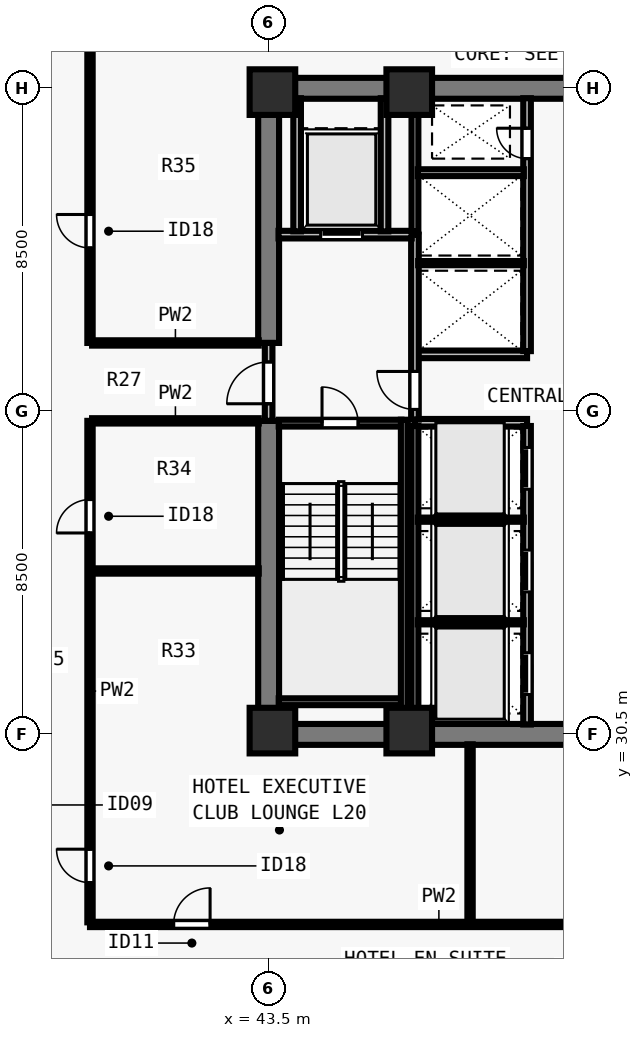
"""IFC4 building model, lengths in metres.
Left out: names, types, materials, properties, quantities, classifications, styles, units other than length and angle.
Written with IfcOpenShell. Run it as: python <this file> out.ifc"""

import sys

from ifc_helpers import new_model, si_unit, direction, frame, frame_2d, origin, origin_2d, place, context, subcontext, project, spatial, rectangle, extrude, element, fill, save


model = new_model("IFC4")
c1 = context("Model", 3, precision=1e-05, world=origin(), true_north=direction((0.0, 1.0)))
c2 = subcontext(c1, "Body", "Model", "MODEL_VIEW")
j1 = project(units=[si_unit("LENGTHUNIT", "METRE"), si_unit("PLANEANGLEUNIT", "RADIAN")], contexts=[c1])
p1 = place(None, origin())
s1 = spatial("IfcSite", under=j1, at=p1, CompositionType="ELEMENT")
p2 = place(p1, origin())
s2 = spatial("IfcBuilding", under=s1, at=p2, CompositionType="ELEMENT")
p3 = place(p2, frame((0.0, 0.0, 76.0)))
s3 = spatial("IfcBuildingStorey", under=s2, at=p3, CompositionType="ELEMENT", Elevation=76.0)
for number, where, z_axis, x_axis in (
    (1, (43.6, 30.6, 0.0), (0.0, 0.0, 1.0), (1.0, 0.0, 0.0)),
    (2, (47.2, 30.6, 0.0), (0.0, 0.0, 1.0), (1.0, 0.0, 0.0)),
    (3, (43.6, 47.4, 0.0), (0.0, 0.0, 1.0), (1.0, 0.0, 0.0)),
    (4, (47.2, 47.4, 0.0), (0.0, 0.0, 1.0), (1.0, 0.0, 0.0)),
):
    element("IfcColumn", number, at=place(p3, frame(where, z_axis=z_axis, x_axis=x_axis)), inside=s3, PredefinedType="COLUMN", context=c2, shape_type="SweptSolid", body=[
        extrude(rectangle(XDim=1.2, YDim=1.2, at=origin_2d()), origin(), (0.0, 0.0, 1.0), 3.5),
    ])
for number, where, z_axis, x_axis in (
    (5, (43.225, 30.5, 0.0), (0.0, 0.0, 1.0), (1.0, 0.0, 0.0)),
    (6, (43.225, 47.5, 0.0), (0.0, 0.0, 1.0), (1.0, 0.0, 0.0)),
):
    element("IfcWall", number, at=place(p3, frame(where, z_axis=z_axis, x_axis=x_axis)), inside=s3, PredefinedType="SHEAR", context=c2, shape_type="SweptSolid", body=[
        extrude(rectangle(XDim=17.55, YDim=0.55, at=frame_2d((8.775, 0.0))), origin(), (0.0, 0.0, 1.0), 3.28),
    ])
p4 = place(p3, frame((43.5, 30.765, 0.0), z_axis=(0.0, 0.0, 1.0), x_axis=(0.0, 1.0, 0.0)))
e7 = element("IfcWall", 7, at=p4, inside=s3, PredefinedType="SHEAR", context=c2, shape_type="SweptSolid", body=[
    extrude(rectangle(XDim=7.985, YDim=0.55, at=frame_2d((3.993, 0.0))), origin(), (0.0, 0.0, 1.0), 3.28),
])
p5 = place(p3, frame((43.5, 40.8, 0.0), z_axis=(0.0, 0.0, 1.0), x_axis=(0.0, 1.0, 0.0)))
e8 = element("IfcWall", 8, at=p5, inside=s3, PredefinedType="SHEAR", context=c2, shape_type="SweptSolid", body=[
    extrude(rectangle(XDim=6.435, YDim=0.55, at=frame_2d((3.218, 0.0))), origin(), (0.0, 0.0, 1.0), 3.28),
])
for number, where, z_axis, x_axis in (
    (9, (47.35, 38.7, 0.0), (0.0, 0.0, 1.0), (1.0, 0.0, 0.0)),
    (10, (47.35, 40.5, 0.0), (0.0, 0.0, 1.0), (1.0, 0.0, 0.0)),
):
    element("IfcWall", number, at=place(p3, frame(where, z_axis=z_axis, x_axis=x_axis)), inside=s3, PredefinedType="SOLIDWALL", context=c2, shape_type="SweptSolid", body=[
        extrude(rectangle(XDim=2.95, YDim=0.2, at=frame_2d((1.475, 0.0))), origin(), (0.0, 0.0, 1.0), 3.28),
    ])
p6 = place(p3, frame((50.3, 30.76, 0.0), z_axis=(0.0, 0.0, 1.0), x_axis=(0.0, 1.0, 0.0)))
e11 = element("IfcWall", 11, at=p6, inside=s3, PredefinedType="SOLIDWALL", context=c2, shape_type="SweptSolid", body=[
    extrude(rectangle(XDim=7.855, YDim=0.2, at=frame_2d((3.927, 0.0))), origin(), (0.0, 0.0, 1.0), 3.28),
])
p7 = place(p6, frame((0.79, 0.0, 0.0)))
e12 = element("IfcOpeningElement", 12, at=p7, cuts=e11, PredefinedType="OPENING", context=c2, shape_type="SweptSolid", body=[
    extrude(rectangle(XDim=1.1, YDim=2.2, at=frame_2d((0.55, 1.1))), frame((0.0, 0.11, 0.0), z_axis=(0.0, -1.0, 0.0), x_axis=(1.0, 0.0, 0.0)), (0.0, 0.0, 1.0), 0.22),
])
p8 = place(p6, frame((3.49, 0.0, 0.0)))
e13 = element("IfcOpeningElement", 13, at=p8, cuts=e11, PredefinedType="OPENING", context=c2, shape_type="SweptSolid", body=[
    extrude(rectangle(XDim=1.1, YDim=2.2, at=frame_2d((0.55, 1.1))), frame((0.0, 0.11, 0.0), z_axis=(0.0, -1.0, 0.0), x_axis=(1.0, 0.0, 0.0)), (0.0, 0.0, 1.0), 0.22),
])
p9 = place(p6, frame((6.19, 0.0, 0.0)))
e14 = element("IfcOpeningElement", 14, at=p9, cuts=e11, PredefinedType="OPENING", context=c2, shape_type="SweptSolid", body=[
    extrude(rectangle(XDim=1.1, YDim=2.2, at=frame_2d((0.55, 1.1))), frame((0.0, 0.11, 0.0), z_axis=(0.0, -1.0, 0.0), x_axis=(1.0, 0.0, 0.0)), (0.0, 0.0, 1.0), 0.22),
])
p10 = place(p3, frame((50.3, 40.585, 0.0), z_axis=(0.0, 0.0, 1.0), x_axis=(0.0, 1.0, 0.0)))
e15 = element("IfcWall", 15, at=p10, inside=s3, PredefinedType="SOLIDWALL", context=c2, shape_type="SweptSolid", body=[
    extrude(rectangle(XDim=6.655, YDim=0.2, at=frame_2d((3.328, 0.0))), origin(), (0.0, 0.0, 1.0), 3.28),
])
p11 = place(p10, frame((5.065, 0.0, 0.0)))
e16 = element("IfcOpeningElement", 16, at=p11, cuts=e15, PredefinedType="OPENING", context=c2, shape_type="SweptSolid", body=[
    extrude(rectangle(XDim=0.8, YDim=2.08, at=frame_2d((0.4, 1.04))), frame((0.0, 0.11, 0.0), z_axis=(0.0, -1.0, 0.0), x_axis=(1.0, 0.0, 0.0)), (0.0, 0.0, 1.0), 0.22),
])
p12 = place(p3, frame((43.5, 38.75, 0.0), z_axis=(0.0, 0.0, 1.0), x_axis=(0.0, 1.0, 0.0)))
e17 = element("IfcWall", 17, at=p12, inside=s3, PredefinedType="SOLIDWALL", context=c2, shape_type="SweptSolid", body=[
    extrude(rectangle(XDim=2.05, YDim=0.2, at=frame_2d((1.025, 0.0))), origin(), (0.0, 0.0, 1.0), 3.28),
])
p13 = place(p12, frame((0.45, 0.0, 0.0)))
e18 = element("IfcOpeningElement", 18, at=p13, cuts=e17, PredefinedType="OPENING", context=c2, shape_type="SweptSolid", body=[
    extrude(rectangle(XDim=1.1, YDim=2.15, at=frame_2d((0.55, 1.075))), frame((0.0, 0.11, 0.0), z_axis=(0.0, -1.0, 0.0), x_axis=(1.0, 0.0, 0.0)), (0.0, 0.0, 1.0), 0.22),
])
p14 = place(p3, frame((47.35, 38.785, 0.0), z_axis=(0.0, 0.0, 1.0), x_axis=(0.0, 1.0, 0.0)))
e19 = element("IfcWall", 19, at=p14, inside=s3, PredefinedType="SOLIDWALL", context=c2, shape_type="SweptSolid", body=[
    extrude(rectangle(XDim=4.865, YDim=0.2, at=frame_2d((2.433, 0.0))), origin(), (0.0, 0.0, 1.0), 3.28),
])
p15 = place(p14, frame((0.265, 0.0, 0.0)))
e20 = element("IfcOpeningElement", 20, at=p15, cuts=e19, PredefinedType="OPENING", context=c2, shape_type="SweptSolid", body=[
    extrude(rectangle(XDim=1.0, YDim=2.15, at=frame_2d((0.5, 1.075))), frame((0.0, 0.11, 0.0), z_axis=(0.0, -1.0, 0.0), x_axis=(1.0, 0.0, 0.0)), (0.0, 0.0, 1.0), 0.22),
])
p16 = place(p3, frame((43.76, 43.65, 0.0), z_axis=(0.0, 0.0, 1.0), x_axis=(1.0, 0.0, 0.0)))
e21 = element("IfcWall", 21, at=p16, inside=s3, PredefinedType="SOLIDWALL", context=c2, shape_type="SweptSolid", body=[
    extrude(rectangle(XDim=3.505, YDim=0.2, at=frame_2d((1.752, 0.0))), origin(), (0.0, 0.0, 1.0), 3.28),
])
p17 = place(p16, frame((1.11, 0.0, 0.0)))
e22 = element("IfcOpeningElement", 22, at=p17, cuts=e21, PredefinedType="OPENING", context=c2, shape_type="SweptSolid", body=[
    extrude(rectangle(XDim=1.1, YDim=2.2, at=frame_2d((0.55, 1.1))), frame((0.0, 0.11, 0.0), z_axis=(0.0, -1.0, 0.0), x_axis=(1.0, 0.0, 0.0)), (0.0, 0.0, 1.0), 0.22),
])
for number, where, z_axis, x_axis in (
    (23, (46.55, 43.735, 0.0), (0.0, 0.0, 1.0), (0.0, 1.0, 0.0)),
    (24, (44.25, 43.735, 0.0), (0.0, 0.0, 1.0), (0.0, 1.0, 0.0)),
):
    element("IfcWall", number, at=place(p3, frame(where, z_axis=z_axis, x_axis=x_axis)), inside=s3, PredefinedType="SOLIDWALL", context=c2, shape_type="SweptSolid", body=[
        extrude(rectangle(XDim=3.505, YDim=0.2, at=frame_2d((1.752, 0.0))), origin(), (0.0, 0.0, 1.0), 3.28),
    ])
p18 = place(p3, frame((47.35, 30.76, 0.0), z_axis=(0.0, 0.0, 1.0), x_axis=(0.0, 1.0, 0.0)))
e25 = element("IfcWall", 25, at=p18, inside=s3, PredefinedType="SOLIDWALL", context=c2, shape_type="SweptSolid", body=[
    extrude(rectangle(XDim=7.855, YDim=0.18, at=frame_2d((3.927, 0.0))), origin(), (0.0, 0.0, 1.0), 3.28),
])
for number, where, z_axis, x_axis in (
    (26, (47.425, 33.45, 0.0), (0.0, 0.0, 1.0), (1.0, 0.0, 0.0)),
    (27, (47.425, 36.15, 0.0), (0.0, 0.0, 1.0), (1.0, 0.0, 0.0)),
):
    element("IfcWall", number, at=place(p3, frame(where, z_axis=z_axis, x_axis=x_axis)), inside=s3, PredefinedType="PARTITIONING", context=c2, shape_type="SweptSolid", body=[
        extrude(rectangle(XDim=2.79, YDim=0.11, at=frame_2d((1.395, 0.0))), origin(), (0.0, 0.0, 1.0), 3.28),
    ])
p19 = place(p3, frame((47.35, 43.735, 0.0), z_axis=(0.0, 0.0, 1.0), x_axis=(0.0, 1.0, 0.0)))
e28 = element("IfcWall", 28, at=p19, inside=s3, PredefinedType="SOLIDWALL", context=c2, shape_type="SweptSolid", body=[
    extrude(rectangle(XDim=3.505, YDim=0.18, at=frame_2d((1.752, 0.0))), origin(), (0.0, 0.0, 1.0), 3.28),
])
p20 = place(p3, frame((47.435, 42.9, 0.0), z_axis=(0.0, 0.0, 1.0), x_axis=(1.0, 0.0, 0.0)))
e29 = element("IfcWall", 29, at=p20, inside=s3, PredefinedType="PARTITIONING", context=c2, shape_type="SweptSolid", body=[
    extrude(rectangle(XDim=2.78, YDim=0.11, at=frame_2d((1.39, 0.0))), origin(), (0.0, 0.0, 1.0), 3.28),
])
p21 = place(p3, frame((47.425, 45.28, 0.0), z_axis=(0.0, 0.0, 1.0), x_axis=(1.0, 0.0, 0.0)))
e30 = element("IfcWall", 30, at=p21, inside=s3, PredefinedType="SOLIDWALL", context=c2, shape_type="SweptSolid", body=[
    extrude(rectangle(XDim=2.79, YDim=0.18, at=frame_2d((1.395, 0.0))), origin(), (0.0, 0.0, 1.0), 3.28),
])
p22 = place(p3, frame((38.8, 25.5, 0.0), z_axis=(0.0, 0.0, 1.0), x_axis=(1.0, 0.0, 0.0)))
e31 = element("IfcWall", 31, at=p22, inside=s3, PredefinedType="PARTITIONING", context=c2, shape_type="SweptSolid", body=[
    extrude(rectangle(XDim=26.4, YDim=0.14, at=frame_2d((13.2, 0.0))), origin(), (0.0, 0.0, 1.0), 3.28),
])
p23 = place(p22, frame((2.2, 0.0, 0.0)))
e32 = element("IfcOpeningElement", 32, at=p23, cuts=e31, PredefinedType="OPENING", context=c2, shape_type="SweptSolid", body=[
    extrude(rectangle(XDim=0.96, YDim=2.12, at=frame_2d((0.48, 1.06))), frame((0.0, 0.08, 0.0), z_axis=(0.0, -1.0, 0.0), x_axis=(1.0, 0.0, 0.0)), (0.0, 0.0, 1.0), 0.16),
])
p24 = place(p22, frame((15.2, 0.0, 0.0)))
e33 = element("IfcOpeningElement", 33, at=p24, cuts=e31, PredefinedType="OPENING", context=c2, shape_type="SweptSolid", body=[
    extrude(rectangle(XDim=0.96, YDim=2.12, at=frame_2d((0.48, 1.06))), frame((0.0, 0.08, 0.0), z_axis=(0.0, -1.0, 0.0), x_axis=(1.0, 0.0, 0.0)), (0.0, 0.0, 1.0), 0.16),
])
p25 = place(p3, frame((38.8, 25.555, 0.0), z_axis=(0.0, 0.0, 1.0), x_axis=(0.0, 1.0, 0.0)))
e34 = element("IfcWall", 34, at=p25, inside=s3, PredefinedType="PARTITIONING", context=c2, shape_type="SweptSolid", body=[
    extrude(rectangle(XDim=13.195, YDim=0.14, at=frame_2d((6.598, 0.0))), origin(), (0.0, 0.0, 1.0), 3.28),
])
p26 = place(p25, frame((1.045, 0.0, 0.0)))
e35 = element("IfcOpeningElement", 35, at=p26, cuts=e34, PredefinedType="OPENING", context=c2, shape_type="SweptSolid", body=[
    extrude(rectangle(XDim=0.88, YDim=2.1, at=frame_2d((0.44, 1.05))), frame((0.0, 0.08, 0.0), z_axis=(0.0, -1.0, 0.0), x_axis=(1.0, 0.0, 0.0)), (0.0, 0.0, 1.0), 0.16),
])
p27 = place(p25, frame((10.245, 0.0, 0.0)))
e36 = element("IfcOpeningElement", 36, at=p27, cuts=e34, PredefinedType="OPENING", context=c2, shape_type="SweptSolid", body=[
    extrude(rectangle(XDim=0.88, YDim=2.1, at=frame_2d((0.44, 1.05))), frame((0.0, 0.08, 0.0), z_axis=(0.0, -1.0, 0.0), x_axis=(1.0, 0.0, 0.0)), (0.0, 0.0, 1.0), 0.16),
])
p28 = place(p3, frame((38.8, 40.8, 0.0), z_axis=(0.0, 0.0, 1.0), x_axis=(0.0, 1.0, 0.0)))
e37 = element("IfcWall", 37, at=p28, inside=s3, PredefinedType="PARTITIONING", context=c2, shape_type="SweptSolid", body=[
    extrude(rectangle(XDim=11.645, YDim=0.14, at=frame_2d((5.823, 0.0))), origin(), (0.0, 0.0, 1.0), 3.28),
])
p29 = place(p28, frame((2.5, 0.0, 0.0)))
e38 = element("IfcOpeningElement", 38, at=p29, cuts=e37, PredefinedType="OPENING", context=c2, shape_type="SweptSolid", body=[
    extrude(rectangle(XDim=0.88, YDim=2.1, at=frame_2d((0.44, 1.05))), frame((0.0, 0.08, 0.0), z_axis=(0.0, -1.0, 0.0), x_axis=(1.0, 0.0, 0.0)), (0.0, 0.0, 1.0), 0.16),
])
for number, where, z_axis, x_axis in (
    (39, (38.855, 38.75, 0.0), (0.0, 0.0, 1.0), (1.0, 0.0, 0.0)),
    (40, (38.855, 40.8, 0.0), (0.0, 0.0, 1.0), (1.0, 0.0, 0.0)),
):
    element("IfcWall", number, at=place(p3, frame(where, z_axis=z_axis, x_axis=x_axis)), inside=s3, PredefinedType="PARTITIONING", context=c2, shape_type="SweptSolid", body=[
        extrude(rectangle(XDim=4.385, YDim=0.14, at=frame_2d((2.192, 0.0))), origin(), (0.0, 0.0, 1.0), 3.28),
    ])
p30 = place(p3, frame((48.8, 25.555, 0.0), z_axis=(0.0, 0.0, 1.0), x_axis=(0.0, 1.0, 0.0)))
e41 = element("IfcWall", 41, at=p30, inside=s3, PredefinedType="PARTITIONING", context=c2, shape_type="SweptSolid", body=[
    extrude(rectangle(XDim=4.685, YDim=0.14, at=frame_2d((2.343, 0.0))), origin(), (0.0, 0.0, 1.0), 3.28),
])
p31 = place(p3, frame((38.855, 34.8, 0.0), z_axis=(0.0, 0.0, 1.0), x_axis=(1.0, 0.0, 0.0)))
e42 = element("IfcWall", 42, at=p31, inside=s3, PredefinedType="PARTITIONING", context=c2, shape_type="SweptSolid", body=[
    extrude(rectangle(XDim=4.385, YDim=0.14, at=frame_2d((2.192, 0.0))), origin(), (0.0, 0.0, 1.0), 3.28),
])
p32 = place(p3, frame((43.765, 38.69, 0.0), z_axis=(0.0, 0.0, 1.0), x_axis=(1.0, 0.0, 0.0)))
e43 = element("IfcWall", 43, at=p32, inside=s3, PredefinedType="SOLIDWALL", context=c2, shape_type="SweptSolid", body=[
    extrude(rectangle(XDim=3.23, YDim=0.18, at=frame_2d((1.615, 0.0))), origin(), (0.0, 0.0, 1.0), 3.28),
])
p33 = place(p32, frame((1.14, 0.0, 0.0)))
e44 = element("IfcOpeningElement", 44, at=p33, cuts=e43, PredefinedType="OPENING", context=c2, shape_type="SweptSolid", body=[
    extrude(rectangle(XDim=0.95, YDim=2.15, at=frame_2d((0.475, 1.075))), frame((0.0, 0.1, 0.0), z_axis=(0.0, -1.0, 0.0), x_axis=(1.0, 0.0, 0.0)), (0.0, 0.0, 1.0), 0.2),
])
p34 = place(p3, frame((43.765, 31.36, 0.0), z_axis=(0.0, 0.0, 1.0), x_axis=(1.0, 0.0, 0.0)))
e45 = element("IfcWall", 45, at=p34, inside=s3, PredefinedType="SOLIDWALL", context=c2, shape_type="SweptSolid", body=[
    extrude(rectangle(XDim=3.23, YDim=0.18, at=frame_2d((1.615, 0.0))), origin(), (0.0, 0.0, 1.0), 3.28),
])
p35 = place(p3, frame((47.07, 38.78, 0.0), z_axis=(0.0, 0.0, 1.0), x_axis=(0.0, -1.0, 0.0)))
e46 = element("IfcWall", 46, at=p35, inside=s3, PredefinedType="SOLIDWALL", context=c2, shape_type="SweptSolid", body=[
    extrude(rectangle(XDim=8.017, YDim=0.18, at=frame_2d((4.009, 0.0))), origin(), (0.0, 0.0, 1.0), 3.28),
])
p36 = place(p13, origin())
e47 = element("IfcDoor", 47, at=p36, inside=s3, OperationType="SINGLE_SWING_LEFT", PredefinedType="DOOR", context=c2, shape_type="SweptSolid", body=[
    extrude(rectangle(XDim=1.1, YDim=2.15, at=frame_2d((0.55, 1.075))), frame((0.0, 0.025, 0.0), z_axis=(0.0, -1.0, 0.0), x_axis=(1.0, 0.0, 0.0)), (0.0, 0.0, 1.0), 0.05),
])
fill(e18, e47)
p37 = place(p15, origin())
e48 = element("IfcDoor", 48, at=p37, inside=s3, OperationType="SINGLE_SWING_RIGHT", PredefinedType="DOOR", context=c2, shape_type="SweptSolid", body=[
    extrude(rectangle(XDim=1.0, YDim=2.15, at=frame_2d((0.5, 1.075))), frame((0.0, 0.025, 0.0), z_axis=(0.0, -1.0, 0.0), x_axis=(1.0, 0.0, 0.0)), (0.0, 0.0, 1.0), 0.05),
])
fill(e20, e48)
p38 = place(p17, origin())
e49 = element("IfcDoor", 49, at=p38, inside=s3, OperationType="SLIDING_TO_LEFT", PredefinedType="DOOR", context=c2, shape_type="SweptSolid", body=[
    extrude(rectangle(XDim=1.1, YDim=2.2, at=frame_2d((0.55, 1.1))), frame((0.0, 0.025, 0.0), z_axis=(0.0, -1.0, 0.0), x_axis=(1.0, 0.0, 0.0)), (0.0, 0.0, 1.0), 0.05),
])
fill(e22, e49)
p39 = place(p7, origin())
e50 = element("IfcDoor", 50, at=p39, inside=s3, OperationType="SLIDING_TO_LEFT", PredefinedType="DOOR", context=c2, shape_type="SweptSolid", body=[
    extrude(rectangle(XDim=1.1, YDim=2.2, at=frame_2d((0.55, 1.1))), frame((0.0, 0.025, 0.0), z_axis=(0.0, -1.0, 0.0), x_axis=(1.0, 0.0, 0.0)), (0.0, 0.0, 1.0), 0.05),
])
fill(e12, e50)
p40 = place(p8, origin())
e51 = element("IfcDoor", 51, at=p40, inside=s3, OperationType="SLIDING_TO_LEFT", PredefinedType="DOOR", context=c2, shape_type="SweptSolid", body=[
    extrude(rectangle(XDim=1.1, YDim=2.2, at=frame_2d((0.55, 1.1))), frame((0.0, 0.025, 0.0), z_axis=(0.0, -1.0, 0.0), x_axis=(1.0, 0.0, 0.0)), (0.0, 0.0, 1.0), 0.05),
])
fill(e13, e51)
p41 = place(p9, origin())
e52 = element("IfcDoor", 52, at=p41, inside=s3, OperationType="SLIDING_TO_LEFT", PredefinedType="DOOR", context=c2, shape_type="SweptSolid", body=[
    extrude(rectangle(XDim=1.1, YDim=2.2, at=frame_2d((0.55, 1.1))), frame((0.0, 0.025, 0.0), z_axis=(0.0, -1.0, 0.0), x_axis=(1.0, 0.0, 0.0)), (0.0, 0.0, 1.0), 0.05),
])
fill(e14, e52)
p42 = place(p11, origin())
e53 = element("IfcDoor", 53, at=p42, inside=s3, OperationType="SINGLE_SWING_RIGHT", PredefinedType="DOOR", context=c2, shape_type="SweptSolid", body=[
    extrude(rectangle(XDim=0.8, YDim=2.08, at=frame_2d((0.4, 1.04))), frame((0.0, 0.025, 0.0), z_axis=(0.0, -1.0, 0.0), x_axis=(1.0, 0.0, 0.0)), (0.0, 0.0, 1.0), 0.05),
])
fill(e16, e53)
p43 = place(p23, origin())
e54 = element("IfcDoor", 54, at=p43, inside=s3, OperationType="SINGLE_SWING_RIGHT", PredefinedType="DOOR", context=c2, shape_type="SweptSolid", body=[
    extrude(rectangle(XDim=0.96, YDim=2.12, at=frame_2d((0.48, 1.06))), frame((0.0, 0.025, 0.0), z_axis=(0.0, -1.0, 0.0), x_axis=(1.0, 0.0, 0.0)), (0.0, 0.0, 1.0), 0.05),
])
fill(e32, e54)
p44 = place(p26, origin())
e55 = element("IfcDoor", 55, at=p44, inside=s3, OperationType="SINGLE_SWING_RIGHT", PredefinedType="DOOR", context=c2, shape_type="SweptSolid", body=[
    extrude(rectangle(XDim=0.88, YDim=2.1, at=frame_2d((0.44, 1.05))), frame((0.0, 0.025, 0.0), z_axis=(0.0, -1.0, 0.0), x_axis=(1.0, 0.0, 0.0)), (0.0, 0.0, 1.0), 0.05),
])
fill(e35, e55)
p45 = place(p27, origin())
e56 = element("IfcDoor", 56, at=p45, inside=s3, OperationType="SINGLE_SWING_LEFT", PredefinedType="DOOR", context=c2, shape_type="SweptSolid", body=[
    extrude(rectangle(XDim=0.88, YDim=2.1, at=frame_2d((0.44, 1.05))), frame((0.0, 0.025, 0.0), z_axis=(0.0, -1.0, 0.0), x_axis=(1.0, 0.0, 0.0)), (0.0, 0.0, 1.0), 0.05),
])
fill(e36, e56)
p46 = place(p29, origin())
e57 = element("IfcDoor", 57, at=p46, inside=s3, OperationType="SINGLE_SWING_RIGHT", PredefinedType="DOOR", context=c2, shape_type="SweptSolid", body=[
    extrude(rectangle(XDim=0.88, YDim=2.1, at=frame_2d((0.44, 1.05))), frame((0.0, 0.025, 0.0), z_axis=(0.0, -1.0, 0.0), x_axis=(1.0, 0.0, 0.0)), (0.0, 0.0, 1.0), 0.05),
])
fill(e38, e57)
p47 = place(p33, origin())
e58 = element("IfcDoor", 58, at=p47, inside=s3, OperationType="SINGLE_SWING_LEFT", PredefinedType="DOOR", context=c2, shape_type="SweptSolid", body=[
    extrude(rectangle(XDim=0.95, YDim=2.15, at=frame_2d((0.475, 1.075))), frame((0.0, 0.025, 0.0), z_axis=(0.0, -1.0, 0.0), x_axis=(1.0, 0.0, 0.0)), (0.0, 0.0, 1.0), 0.05),
])
fill(e44, e58)
save(model, sys.argv[1])
